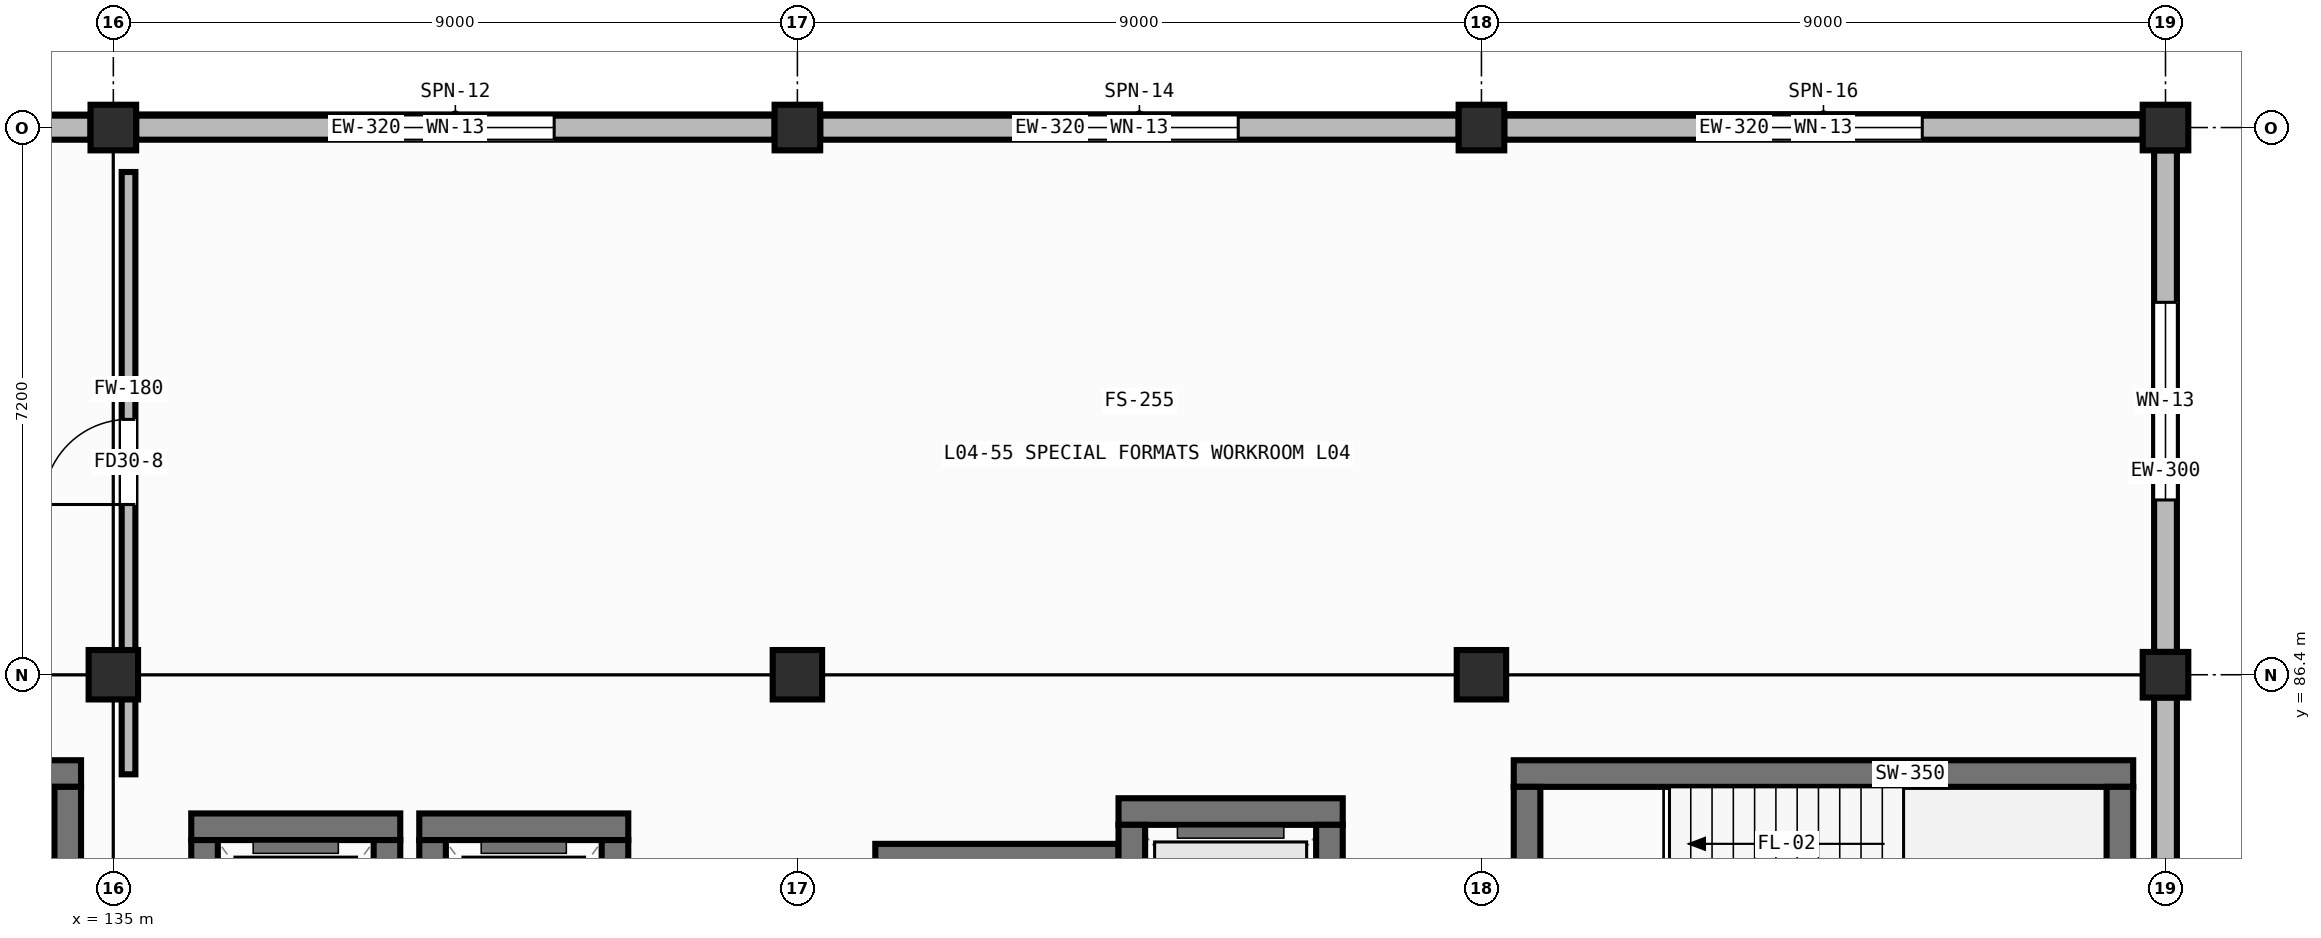
"""IFC4 building model, lengths in metres.
Left out: names, types, materials, properties, quantities, classifications, styles, units other than length and angle.
Written with IfcOpenShell. Run it as: python <this file> out.ifc"""

import sys

from ifc_helpers import new_model, si_unit, direction, frame, frame_2d, origin, origin_2d, place, context, subcontext, project, spatial, rectangle, hollow_rectangle, extrude, element, fill, save


model = new_model("IFC4")
c1 = context("Model", 3, precision=1e-05, world=origin(), true_north=direction((0.0, 1.0)))
c2 = subcontext(c1, "Body", "Model", "MODEL_VIEW")
j1 = project(units=[si_unit("LENGTHUNIT", "METRE"), si_unit("PLANEANGLEUNIT", "RADIAN")], contexts=[c1])
p1 = place(None, origin())
s1 = spatial("IfcSite", under=j1, at=p1, CompositionType="ELEMENT")
p2 = place(p1, origin())
s2 = spatial("IfcBuilding", under=s1, at=p2, CompositionType="ELEMENT")
p3 = place(p2, frame((0.0, 0.0, 12.8)))
s3 = spatial("IfcBuildingStorey", under=s2, at=p3, CompositionType="ELEMENT", Elevation=12.8)
p4 = place(p3, frame((135.0, 86.4, 0.0), z_axis=(0.0, 0.0, 1.0), x_axis=(1.0, 0.0, 0.0)))
e1 = element("IfcColumn", 1, at=p4, inside=s3, PredefinedType="COLUMN", context=c2, shape_type="SweptSolid", body=[
    extrude(hollow_rectangle(XDim=0.65, YDim=0.65, WallThickness=0.025, at=origin_2d()), origin(), (0.0, 0.0, 1.0), 4.2),
])
p5 = place(p3, frame((135.0, 93.6, 0.0), z_axis=(0.0, 0.0, 1.0), x_axis=(1.0, 0.0, 0.0)))
e2 = element("IfcColumn", 2, at=p5, inside=s3, PredefinedType="COLUMN", context=c2, shape_type="SweptSolid", body=[
    extrude(hollow_rectangle(XDim=0.6, YDim=0.6, WallThickness=0.025, at=origin_2d()), origin(), (0.0, 0.0, 1.0), 4.2),
])
p6 = place(p3, frame((144.0, 86.4, 0.0), z_axis=(0.0, 0.0, 1.0), x_axis=(1.0, 0.0, 0.0)))
e3 = element("IfcColumn", 3, at=p6, inside=s3, PredefinedType="COLUMN", context=c2, shape_type="SweptSolid", body=[
    extrude(hollow_rectangle(XDim=0.65, YDim=0.65, WallThickness=0.025, at=origin_2d()), origin(), (0.0, 0.0, 1.0), 4.2),
])
p7 = place(p3, frame((144.0, 93.6, 0.0), z_axis=(0.0, 0.0, 1.0), x_axis=(1.0, 0.0, 0.0)))
e4 = element("IfcColumn", 4, at=p7, inside=s3, PredefinedType="COLUMN", context=c2, shape_type="SweptSolid", body=[
    extrude(hollow_rectangle(XDim=0.6, YDim=0.6, WallThickness=0.025, at=origin_2d()), origin(), (0.0, 0.0, 1.0), 4.2),
])
p8 = place(p3, frame((153.0, 86.4, 0.0), z_axis=(0.0, 0.0, 1.0), x_axis=(1.0, 0.0, 0.0)))
e5 = element("IfcColumn", 5, at=p8, inside=s3, PredefinedType="COLUMN", context=c2, shape_type="SweptSolid", body=[
    extrude(hollow_rectangle(XDim=0.65, YDim=0.65, WallThickness=0.025, at=origin_2d()), origin(), (0.0, 0.0, 1.0), 4.2),
])
for number, where, z_axis, x_axis in (
    (6, (153.0, 93.6, 0.0), (0.0, 0.0, 1.0), (1.0, 0.0, 0.0)),
    (7, (162.0, 86.4, 0.0), (0.0, 0.0, 1.0), (1.0, 0.0, 0.0)),
    (8, (162.0, 93.6, 0.0), (0.0, 0.0, 1.0), (1.0, 0.0, 0.0)),
):
    element("IfcColumn", number, at=place(p3, frame(where, z_axis=z_axis, x_axis=x_axis)), inside=s3, PredefinedType="COLUMN", context=c2, shape_type="SweptSolid", body=[
        extrude(hollow_rectangle(XDim=0.6, YDim=0.6, WallThickness=0.025, at=origin_2d()), origin(), (0.0, 0.0, 1.0), 4.2),
    ])
p9 = place(p3, frame((134.7, 93.6, 0.0), z_axis=(0.0, 0.0, 1.0), x_axis=(-1.0, 0.0, 0.0)))
e9 = element("IfcWall", 9, at=p9, inside=s3, PredefinedType="STANDARD", context=c2, shape_type="SweptSolid", body=[
    extrude(rectangle(XDim=8.4, YDim=0.32, at=frame_2d((4.2, 0.0))), origin(), (0.0, 0.0, 1.0), 3.49),
])
p10 = place(p3, frame((143.7, 93.6, 0.0), z_axis=(0.0, 0.0, 1.0), x_axis=(-1.0, 0.0, 0.0)))
e10 = element("IfcWall", 10, at=p10, inside=s3, PredefinedType="STANDARD", context=c2, shape_type="SweptSolid", body=[
    extrude(rectangle(XDim=8.4, YDim=0.32, at=frame_2d((4.2, 0.0))), origin(), (0.0, 0.0, 1.0), 3.49),
])
p11 = place(p10, frame((2.9, 0.0, 0.85)))
e11 = element("IfcOpeningElement", 11, at=p11, cuts=e10, PredefinedType="OPENING", context=c2, shape_type="SweptSolid", body=[
    extrude(rectangle(XDim=2.6, YDim=1.6, at=frame_2d((1.3, 0.8))), frame((0.0, 0.172, 0.0), z_axis=(0.0, -1.0, 0.0), x_axis=(1.0, 0.0, 0.0)), (0.0, 0.0, 1.0), 0.344),
])
p12 = place(p3, frame((152.7, 93.6, 0.0), z_axis=(0.0, 0.0, 1.0), x_axis=(-1.0, 0.0, 0.0)))
e12 = element("IfcWall", 12, at=p12, inside=s3, PredefinedType="STANDARD", context=c2, shape_type="SweptSolid", body=[
    extrude(rectangle(XDim=8.4, YDim=0.32, at=frame_2d((4.2, 0.0))), origin(), (0.0, 0.0, 1.0), 3.49),
])
p13 = place(p12, frame((2.9, 0.0, 0.85)))
e13 = element("IfcOpeningElement", 13, at=p13, cuts=e12, PredefinedType="OPENING", context=c2, shape_type="SweptSolid", body=[
    extrude(rectangle(XDim=2.6, YDim=1.6, at=frame_2d((1.3, 0.8))), frame((0.0, 0.172, 0.0), z_axis=(0.0, -1.0, 0.0), x_axis=(1.0, 0.0, 0.0)), (0.0, 0.0, 1.0), 0.344),
])
p14 = place(p3, frame((161.7, 93.6, 0.0), z_axis=(0.0, 0.0, 1.0), x_axis=(-1.0, 0.0, 0.0)))
e14 = element("IfcWall", 14, at=p14, inside=s3, PredefinedType="STANDARD", context=c2, shape_type="SweptSolid", body=[
    extrude(rectangle(XDim=8.4, YDim=0.32, at=frame_2d((4.2, 0.0))), origin(), (0.0, 0.0, 1.0), 3.49),
])
p15 = place(p14, frame((2.9, 0.0, 0.85)))
e15 = element("IfcOpeningElement", 15, at=p15, cuts=e14, PredefinedType="OPENING", context=c2, shape_type="SweptSolid", body=[
    extrude(rectangle(XDim=2.6, YDim=1.6, at=frame_2d((1.3, 0.8))), frame((0.0, 0.172, 0.0), z_axis=(0.0, -1.0, 0.0), x_axis=(1.0, 0.0, 0.0)), (0.0, 0.0, 1.0), 0.344),
])
p16 = place(p3, frame((162.0, 86.1, 0.0), z_axis=(0.0, 0.0, 1.0), x_axis=(0.0, -1.0, 0.0)))
e16 = element("IfcWall", 16, at=p16, inside=s3, PredefinedType="STANDARD", context=c2, shape_type="SweptSolid", body=[
    extrude(rectangle(XDim=6.6, YDim=0.3, at=frame_2d((3.3, 0.0))), origin(), (0.0, 0.0, 1.0), 3.49),
])
p17 = place(p3, frame((162.0, 93.3, 0.0), z_axis=(0.0, 0.0, 1.0), x_axis=(0.0, -1.0, 0.0)))
e17 = element("IfcWall", 17, at=p17, inside=s3, PredefinedType="STANDARD", context=c2, shape_type="SweptSolid", body=[
    extrude(rectangle(XDim=6.6, YDim=0.3, at=frame_2d((3.3, 0.0))), origin(), (0.0, 0.0, 1.0), 3.49),
])
p18 = place(p17, frame((2.0, 0.0, 0.85)))
e18 = element("IfcOpeningElement", 18, at=p18, cuts=e17, PredefinedType="OPENING", context=c2, shape_type="SweptSolid", body=[
    extrude(rectangle(XDim=2.6, YDim=1.6, at=frame_2d((1.3, 0.8))), frame((0.0, 0.162, 0.0), z_axis=(0.0, -1.0, 0.0), x_axis=(1.0, 0.0, 0.0)), (0.0, 0.0, 1.0), 0.324),
])
p19 = place(p3, frame((126.425, 85.1, 0.0), z_axis=(0.0, 0.0, 1.0), x_axis=(1.0, 0.0, 0.0)))
e19 = element("IfcWall", 19, at=p19, inside=s3, PredefinedType="SHEAR", context=c2, shape_type="SweptSolid", body=[
    extrude(rectangle(XDim=8.15, YDim=0.35, at=frame_2d((4.075, 0.0))), origin(), (0.0, 0.0, 1.0), 3.94),
])
p20 = place(p3, frame((134.4, 81.375, 0.0), z_axis=(0.0, 0.0, 1.0), x_axis=(0.0, 1.0, 0.0)))
e20 = element("IfcWall", 20, at=p20, inside=s3, PredefinedType="SHEAR", context=c2, shape_type="SweptSolid", body=[
    extrude(rectangle(XDim=3.55, YDim=0.35, at=frame_2d((1.775, 0.0))), origin(), (0.0, 0.0, 1.0), 3.94),
])
p21 = place(p3, frame((153.425, 85.1, 0.0), z_axis=(0.0, 0.0, 1.0), x_axis=(1.0, 0.0, 0.0)))
e21 = element("IfcWall", 21, at=p21, inside=s3, PredefinedType="SHEAR", context=c2, shape_type="SweptSolid", body=[
    extrude(rectangle(XDim=8.15, YDim=0.35, at=frame_2d((4.075, 0.0))), origin(), (0.0, 0.0, 1.0), 3.94),
])
for number, where, z_axis, x_axis in (
    (22, (153.6, 81.375, 0.0), (0.0, 0.0, 1.0), (0.0, 1.0, 0.0)),
    (23, (161.4, 81.375, 0.0), (0.0, 0.0, 1.0), (0.0, 1.0, 0.0)),
):
    element("IfcWall", number, at=place(p3, frame(where, z_axis=z_axis, x_axis=x_axis)), inside=s3, PredefinedType="SHEAR", context=c2, shape_type="SweptSolid", body=[
        extrude(rectangle(XDim=3.55, YDim=0.35, at=frame_2d((1.775, 0.0))), origin(), (0.0, 0.0, 1.0), 3.94),
    ])
p22 = place(p3, frame((136.025, 84.4, 0.0), z_axis=(0.0, 0.0, 1.0), x_axis=(1.0, 0.0, 0.0)))
e24 = element("IfcWall", 24, at=p22, inside=s3, PredefinedType="SHEAR", context=c2, shape_type="SweptSolid", body=[
    extrude(rectangle(XDim=2.75, YDim=0.35, at=frame_2d((1.375, 0.0))), origin(), (0.0, 0.0, 1.0), 3.94),
])
for number, where, z_axis, x_axis in (
    (25, (136.2, 81.375, 0.0), (0.0, 0.0, 1.0), (0.0, 1.0, 0.0)),
    (26, (138.6, 81.375, 0.0), (0.0, 0.0, 1.0), (0.0, 1.0, 0.0)),
):
    element("IfcWall", number, at=place(p3, frame(where, z_axis=z_axis, x_axis=x_axis)), inside=s3, PredefinedType="SHEAR", context=c2, shape_type="SweptSolid", body=[
        extrude(rectangle(XDim=2.85, YDim=0.35, at=frame_2d((1.425, 0.0))), origin(), (0.0, 0.0, 1.0), 3.94),
    ])
p23 = place(p3, frame((139.025, 84.4, 0.0), z_axis=(0.0, 0.0, 1.0), x_axis=(1.0, 0.0, 0.0)))
e27 = element("IfcWall", 27, at=p23, inside=s3, PredefinedType="SHEAR", context=c2, shape_type="SweptSolid", body=[
    extrude(rectangle(XDim=2.75, YDim=0.35, at=frame_2d((1.375, 0.0))), origin(), (0.0, 0.0, 1.0), 3.94),
])
for number, where, z_axis, x_axis in (
    (28, (139.2, 81.375, 0.0), (0.0, 0.0, 1.0), (0.0, 1.0, 0.0)),
    (29, (141.6, 81.375, 0.0), (0.0, 0.0, 1.0), (0.0, 1.0, 0.0)),
):
    element("IfcWall", number, at=place(p3, frame(where, z_axis=z_axis, x_axis=x_axis)), inside=s3, PredefinedType="SHEAR", context=c2, shape_type="SweptSolid", body=[
        extrude(rectangle(XDim=2.85, YDim=0.35, at=frame_2d((1.425, 0.0))), origin(), (0.0, 0.0, 1.0), 3.94),
    ])
p24 = place(p3, frame((145.025, 84.0, 0.0), z_axis=(0.0, 0.0, 1.0), x_axis=(1.0, 0.0, 0.0)))
e30 = element("IfcWall", 30, at=p24, inside=s3, PredefinedType="SHEAR", context=c2, shape_type="SweptSolid", body=[
    extrude(rectangle(XDim=3.2, YDim=0.35, at=frame_2d((1.6, 0.0))), origin(), (0.0, 0.0, 1.0), 3.94),
])
p25 = place(p3, frame((148.225, 84.6, 0.0), z_axis=(0.0, 0.0, 1.0), x_axis=(1.0, 0.0, 0.0)))
e31 = element("IfcWall", 31, at=p25, inside=s3, PredefinedType="SHEAR", context=c2, shape_type="SweptSolid", body=[
    extrude(rectangle(XDim=2.95, YDim=0.35, at=frame_2d((1.475, 0.0))), origin(), (0.0, 0.0, 1.0), 3.94),
])
for number, where, z_axis, x_axis in (
    (32, (148.4, 81.375, 0.0), (0.0, 0.0, 1.0), (0.0, 1.0, 0.0)),
    (33, (151.0, 81.375, 0.0), (0.0, 0.0, 1.0), (0.0, 1.0, 0.0)),
):
    element("IfcWall", number, at=place(p3, frame(where, z_axis=z_axis, x_axis=x_axis)), inside=s3, PredefinedType="SHEAR", context=c2, shape_type="SweptSolid", body=[
        extrude(rectangle(XDim=3.05, YDim=0.35, at=frame_2d((1.525, 0.0))), origin(), (0.0, 0.0, 1.0), 3.94),
    ])
p26 = place(p3, frame((135.2, 85.09, 0.0), z_axis=(0.0, 0.0, 1.0), x_axis=(0.0, 1.0, 0.0)))
e34 = element("IfcWall", 34, at=p26, inside=s3, PredefinedType="PARTITIONING", context=c2, shape_type="SweptSolid", body=[
    extrude(rectangle(XDim=7.925, YDim=0.18, at=frame_2d((3.962, 0.0))), origin(), (0.0, 0.0, 1.0), 3.22),
])
p27 = place(p26, frame((3.55, 0.0, 0.0)))
e35 = element("IfcOpeningElement", 35, at=p27, cuts=e34, PredefinedType="OPENING", context=c2, shape_type="SweptSolid", body=[
    extrude(rectangle(XDim=1.12, YDim=2.08, at=frame_2d((0.56, 1.04))), frame((0.0, 0.102, 0.0), z_axis=(0.0, -1.0, 0.0), x_axis=(1.0, 0.0, 0.0)), (0.0, 0.0, 1.0), 0.204),
])
p28 = place(p11, origin())
e36 = element("IfcWindow", 36, at=p28, inside=s3, PartitioningType="DOUBLE_PANEL_VERTICAL", PredefinedType="WINDOW", context=c2, shape_type="SweptSolid", body=[
    extrude(rectangle(XDim=2.6, YDim=1.6, at=frame_2d((1.3, 0.8))), frame((0.0, 0.03, 0.0), z_axis=(0.0, -1.0, 0.0), x_axis=(1.0, 0.0, 0.0)), (0.0, 0.0, 1.0), 0.06),
])
fill(e11, e36)
p29 = place(p13, origin())
e37 = element("IfcWindow", 37, at=p29, inside=s3, PartitioningType="DOUBLE_PANEL_VERTICAL", PredefinedType="WINDOW", context=c2, shape_type="SweptSolid", body=[
    extrude(rectangle(XDim=2.6, YDim=1.6, at=frame_2d((1.3, 0.8))), frame((0.0, 0.03, 0.0), z_axis=(0.0, -1.0, 0.0), x_axis=(1.0, 0.0, 0.0)), (0.0, 0.0, 1.0), 0.06),
])
fill(e13, e37)
p30 = place(p15, origin())
e38 = element("IfcWindow", 38, at=p30, inside=s3, PartitioningType="DOUBLE_PANEL_VERTICAL", PredefinedType="WINDOW", context=c2, shape_type="SweptSolid", body=[
    extrude(rectangle(XDim=2.6, YDim=1.6, at=frame_2d((1.3, 0.8))), frame((0.0, 0.03, 0.0), z_axis=(0.0, -1.0, 0.0), x_axis=(1.0, 0.0, 0.0)), (0.0, 0.0, 1.0), 0.06),
])
fill(e15, e38)
p31 = place(p18, origin())
e39 = element("IfcWindow", 39, at=p31, inside=s3, PartitioningType="DOUBLE_PANEL_VERTICAL", PredefinedType="WINDOW", context=c2, shape_type="SweptSolid", body=[
    extrude(rectangle(XDim=2.6, YDim=1.6, at=frame_2d((1.3, 0.8))), frame((0.0, 0.03, 0.0), z_axis=(0.0, -1.0, 0.0), x_axis=(1.0, 0.0, 0.0)), (0.0, 0.0, 1.0), 0.06),
])
fill(e18, e39)
p32 = place(p27, origin())
e40 = element("IfcDoor", 40, at=p32, inside=s3, OperationType="SINGLE_SWING_LEFT", PredefinedType="DOOR", context=c2, shape_type="SweptSolid", body=[
    extrude(rectangle(XDim=1.12, YDim=2.08, at=frame_2d((0.56, 1.04))), frame((0.0, 0.025, 0.0), z_axis=(0.0, -1.0, 0.0), x_axis=(1.0, 0.0, 0.0)), (0.0, 0.0, 1.0), 0.05),
])
fill(e35, e40)
save(model, sys.argv[1])
